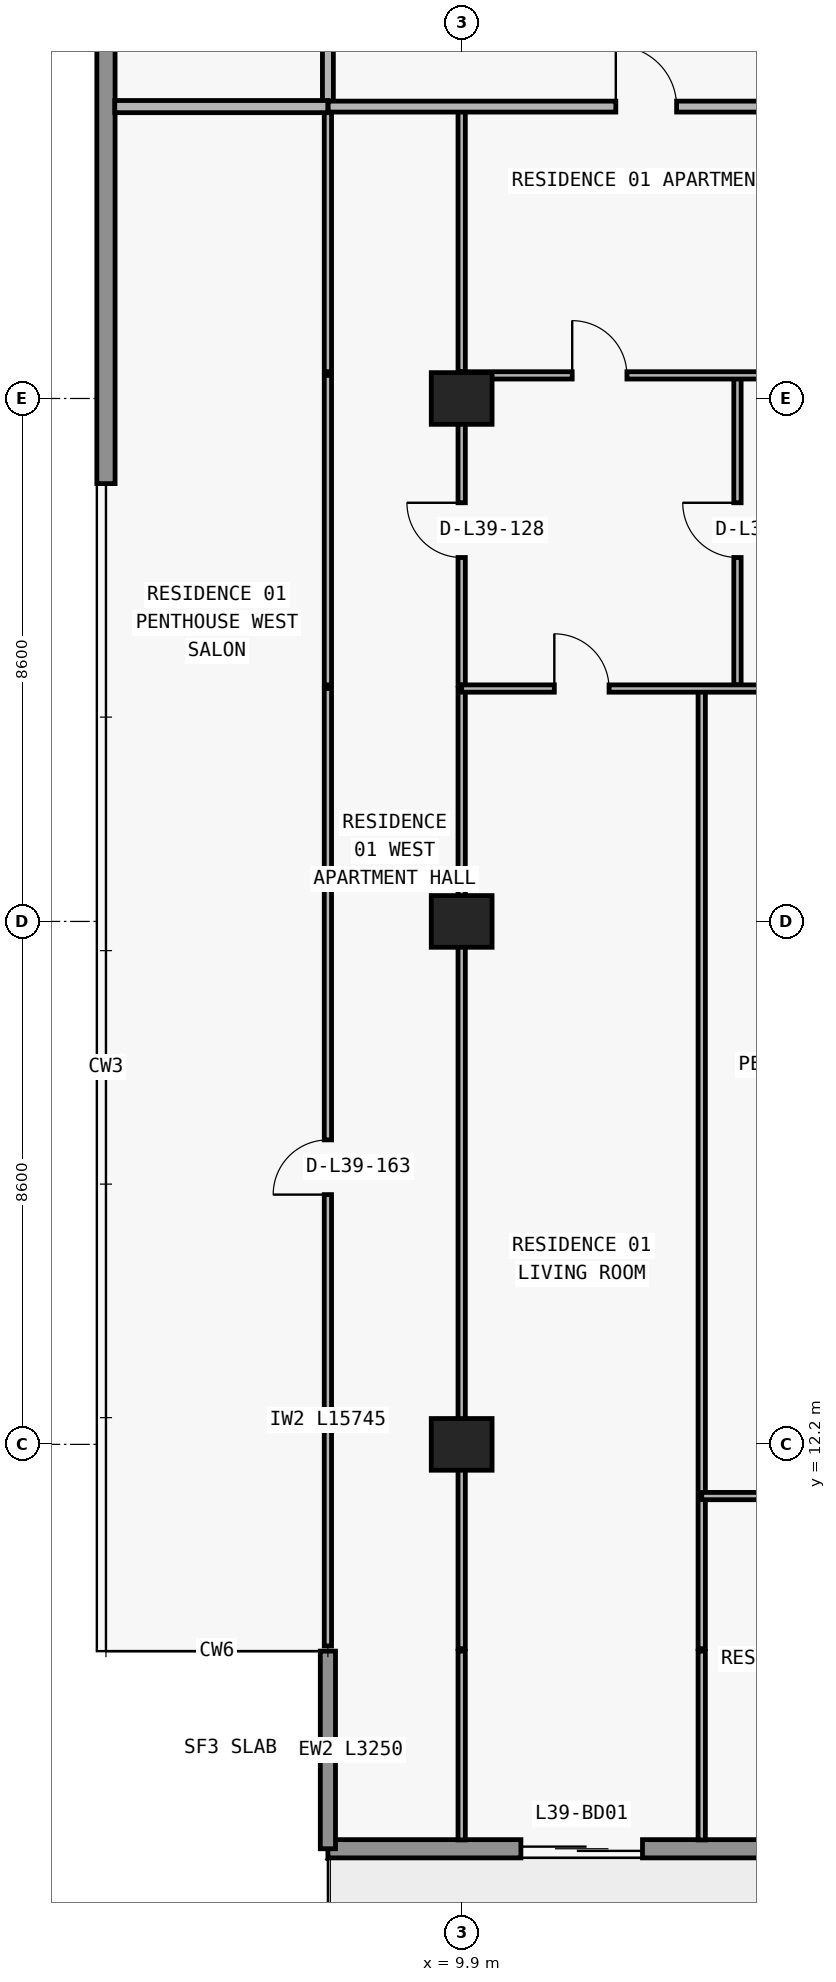
"""IFC4 building model, lengths in metres.
Left out: names, types, materials, properties, quantities, classifications, styles, units other than length and angle.
Written with IfcOpenShell. Run it as: python <this file> out.ifc"""

import sys

from ifc_helpers import new_model, si_unit, direction, frame, frame_2d, origin, origin_2d, place, context, subcontext, project, spatial, rectangle, extrude, element, fill, save


model = new_model("IFC4")
c1 = context("Model", 3, precision=1e-05, world=origin(), true_north=direction((0.0, 1.0)))
c2 = subcontext(c1, "Body", "Model", "MODEL_VIEW")
j1 = project(units=[si_unit("LENGTHUNIT", "METRE"), si_unit("PLANEANGLEUNIT", "RADIAN")], contexts=[c1])
p1 = place(None, origin())
s1 = spatial("IfcSite", under=j1, at=p1, CompositionType="ELEMENT")
p2 = place(p1, origin())
s2 = spatial("IfcBuilding", under=s1, at=p2, CompositionType="ELEMENT")
p3 = place(p2, frame((0.0, 0.0, 142.2)))
s3 = spatial("IfcBuildingStorey", under=s2, at=p3, CompositionType="ELEMENT", Elevation=142.2)
for number, where, z_axis, x_axis in (
    (1, (9.9, 12.2, 0.0), (0.0, 0.0, 1.0), (1.0, 0.0, 0.0)),
    (2, (9.9, 20.8, 0.0), (0.0, 0.0, 1.0), (1.0, 0.0, 0.0)),
    (3, (9.9, 29.4, 0.0), (0.0, 0.0, 1.0), (1.0, 0.0, 0.0)),
):
    element("IfcColumn", number, at=place(p3, frame(where, z_axis=z_axis, x_axis=x_axis)), inside=s3, PredefinedType="COLUMN", context=c2, shape_type="SweptSolid", body=[
        extrude(rectangle(XDim=1.0, YDim=0.85, at=origin_2d()), origin(), (0.0, 0.0, 1.0), 3.05),
    ])
p4 = place(p3, frame((70.1, 5.55, 0.0), z_axis=(0.0, 0.0, 1.0), x_axis=(-1.0, 0.0, 0.0)))
e4 = element("IfcWall", 4, at=p4, inside=s3, PredefinedType="STANDARD", context=c2, shape_type="SweptSolid", body=[
    extrude(rectangle(XDim=62.4, YDim=0.3, at=frame_2d((31.2, 0.0))), origin(), (0.0, 0.0, 1.0), 3.05),
])
p5 = place(p4, frame((57.226, 0.0, 0.0)))
e5 = element("IfcOpeningElement", 5, at=p5, cuts=e4, PredefinedType="OPENING", context=c2, shape_type="SweptSolid", body=[
    extrude(rectangle(XDim=2.0, YDim=2.3, at=frame_2d((1.0, 1.15))), frame((0.0, 0.16, 0.0), z_axis=(0.0, -1.0, 0.0), x_axis=(1.0, 0.0, 0.0)), (0.0, 0.0, 1.0), 0.32),
])
p6 = place(p4, frame((52.926, 0.0, 0.85)))
e6 = element("IfcOpeningElement", 6, at=p6, cuts=e4, PredefinedType="OPENING", context=c2, shape_type="SweptSolid", body=[
    extrude(rectangle(XDim=2.2, YDim=1.55, at=frame_2d((1.1, 0.775))), frame((0.0, 0.16, 0.0), z_axis=(0.0, -1.0, 0.0), x_axis=(1.0, 0.0, 0.0)), (0.0, 0.0, 1.0), 0.32),
])
p7 = place(p4, frame((48.49, 0.0, 0.0)))
e7 = element("IfcOpeningElement", 7, at=p7, cuts=e4, PredefinedType="OPENING", context=c2, shape_type="SweptSolid", body=[
    extrude(rectangle(XDim=2.0, YDim=2.3, at=frame_2d((1.0, 1.15))), frame((0.0, 0.16, 0.0), z_axis=(0.0, -1.0, 0.0), x_axis=(1.0, 0.0, 0.0)), (0.0, 0.0, 1.0), 0.32),
])
p8 = place(p4, frame((44.39, 0.0, 0.85)))
e8 = element("IfcOpeningElement", 8, at=p8, cuts=e4, PredefinedType="OPENING", context=c2, shape_type="SweptSolid", body=[
    extrude(rectangle(XDim=1.8, YDim=1.55, at=frame_2d((0.9, 0.775))), frame((0.0, 0.16, 0.0), z_axis=(0.0, -1.0, 0.0), x_axis=(1.0, 0.0, 0.0)), (0.0, 0.0, 1.0), 0.32),
])
p9 = place(p4, frame((40.426, 0.0, 0.0)))
e9 = element("IfcOpeningElement", 9, at=p9, cuts=e4, PredefinedType="OPENING", context=c2, shape_type="SweptSolid", body=[
    extrude(rectangle(XDim=2.0, YDim=2.3, at=frame_2d((1.0, 1.15))), frame((0.0, 0.16, 0.0), z_axis=(0.0, -1.0, 0.0), x_axis=(1.0, 0.0, 0.0)), (0.0, 0.0, 1.0), 0.32),
])
p10 = place(p4, frame((36.126, 0.0, 0.85)))
e10 = element("IfcOpeningElement", 10, at=p10, cuts=e4, PredefinedType="OPENING", context=c2, shape_type="SweptSolid", body=[
    extrude(rectangle(XDim=2.2, YDim=1.55, at=frame_2d((1.1, 0.775))), frame((0.0, 0.16, 0.0), z_axis=(0.0, -1.0, 0.0), x_axis=(1.0, 0.0, 0.0)), (0.0, 0.0, 1.0), 0.32),
])
p11 = place(p4, frame((32.09, 0.0, 0.0)))
e11 = element("IfcOpeningElement", 11, at=p11, cuts=e4, PredefinedType="OPENING", context=c2, shape_type="SweptSolid", body=[
    extrude(rectangle(XDim=2.0, YDim=2.3, at=frame_2d((1.0, 1.15))), frame((0.0, 0.16, 0.0), z_axis=(0.0, -1.0, 0.0), x_axis=(1.0, 0.0, 0.0)), (0.0, 0.0, 1.0), 0.32),
])
p12 = place(p4, frame((28.21, 0.0, 0.65)))
e12 = element("IfcOpeningElement", 12, at=p12, cuts=e4, PredefinedType="OPENING", context=c2, shape_type="SweptSolid", body=[
    extrude(rectangle(XDim=2.6, YDim=1.85, at=frame_2d((1.3, 0.925))), frame((0.0, 0.16, 0.0), z_axis=(0.0, -1.0, 0.0), x_axis=(1.0, 0.0, 0.0)), (0.0, 0.0, 1.0), 0.32),
])
p13 = place(p4, frame((22.1, 0.0, 0.85)))
e13 = element("IfcOpeningElement", 13, at=p13, cuts=e4, PredefinedType="OPENING", context=c2, shape_type="SweptSolid", body=[
    extrude(rectangle(XDim=2.2, YDim=1.55, at=frame_2d((1.1, 0.775))), frame((0.0, 0.16, 0.0), z_axis=(0.0, -1.0, 0.0), x_axis=(1.0, 0.0, 0.0)), (0.0, 0.0, 1.0), 0.32),
])
p14 = place(p4, frame((16.09, 0.0, 0.0)))
e14 = element("IfcOpeningElement", 14, at=p14, cuts=e4, PredefinedType="OPENING", context=c2, shape_type="SweptSolid", body=[
    extrude(rectangle(XDim=2.0, YDim=2.3, at=frame_2d((1.0, 1.15))), frame((0.0, 0.16, 0.0), z_axis=(0.0, -1.0, 0.0), x_axis=(1.0, 0.0, 0.0)), (0.0, 0.0, 1.0), 0.32),
])
p15 = place(p4, frame((11.41, 0.0, 0.65)))
e15 = element("IfcOpeningElement", 15, at=p15, cuts=e4, PredefinedType="OPENING", context=c2, shape_type="SweptSolid", body=[
    extrude(rectangle(XDim=2.6, YDim=1.85, at=frame_2d((1.3, 0.925))), frame((0.0, 0.16, 0.0), z_axis=(0.0, -1.0, 0.0), x_axis=(1.0, 0.0, 0.0)), (0.0, 0.0, 1.0), 0.32),
])
p16 = place(p4, frame((5.3, 0.0, 0.85)))
e16 = element("IfcOpeningElement", 16, at=p16, cuts=e4, PredefinedType="OPENING", context=c2, shape_type="SweptSolid", body=[
    extrude(rectangle(XDim=2.2, YDim=1.55, at=frame_2d((1.1, 0.775))), frame((0.0, 0.16, 0.0), z_axis=(0.0, -1.0, 0.0), x_axis=(1.0, 0.0, 0.0)), (0.0, 0.0, 1.0), 0.32),
])
p17 = place(p3, frame((7.7, 8.8, 0.0), z_axis=(0.0, 0.0, 1.0), x_axis=(0.0, -1.0, 0.0)))
e17 = element("IfcWall", 17, at=p17, inside=s3, PredefinedType="ELEMENTEDWALL", context=c2, shape_type="SweptSolid", body=[
    extrude(rectangle(XDim=3.25, YDim=0.25, at=frame_2d((1.625, 0.0))), origin(), (0.0, 0.0, 1.0), 3.05),
])
p18 = place(p3, frame((4.05, 28.0, 0.0), z_axis=(0.0, 0.0, 1.0), x_axis=(0.0, 1.0, 0.0)))
e18 = element("IfcWall", 18, at=p18, inside=s3, PredefinedType="STANDARD", context=c2, shape_type="SweptSolid", body=[
    extrude(rectangle(XDim=19.2, YDim=0.3, at=frame_2d((9.6, 0.0))), origin(), (0.0, 0.0, 1.0), 3.05),
])
p19 = place(p3, frame((7.7, 8.885, 0.0), z_axis=(0.0, 0.0, 1.0), x_axis=(0.0, 1.0, 0.0)))
e19 = element("IfcWall", 19, at=p19, inside=s3, PredefinedType="PARTITIONING", context=c2, shape_type="SweptSolid", body=[
    extrude(rectangle(XDim=15.745, YDim=0.12, at=frame_2d((7.873, 0.0))), origin(), (0.0, 0.0, 1.0), 3.05),
])
p20 = place(p19, frame((7.423, 0.0, 0.0)))
e20 = element("IfcOpeningElement", 20, at=p20, cuts=e19, PredefinedType="OPENING", context=c2, shape_type="SweptSolid", body=[
    extrude(rectangle(XDim=0.9, YDim=2.15, at=frame_2d((0.45, 1.075))), frame((0.0, 0.07, 0.0), z_axis=(0.0, -1.0, 0.0), x_axis=(1.0, 0.0, 0.0)), (0.0, 0.0, 1.0), 0.14),
])
p21 = place(p3, frame((7.7, 24.69, 0.0), z_axis=(0.0, 0.0, 1.0), x_axis=(0.0, 1.0, 0.0)))
e21 = element("IfcWall", 21, at=p21, inside=s3, PredefinedType="PARTITIONING", context=c2, shape_type="SweptSolid", body=[
    extrude(rectangle(XDim=5.09, YDim=0.12, at=frame_2d((2.545, 0.0))), origin(), (0.0, 0.0, 1.0), 3.05),
])
p22 = place(p3, frame((7.7, 29.84, 0.0), z_axis=(0.0, 0.0, 1.0), x_axis=(0.0, 1.0, 0.0)))
e22 = element("IfcWall", 22, at=p22, inside=s3, PredefinedType="PARTITIONING", context=c2, shape_type="SweptSolid", body=[
    extrude(rectangle(XDim=4.36, YDim=0.12, at=frame_2d((2.18, 0.0))), origin(), (0.0, 0.0, 1.0), 3.05),
])
p23 = place(p3, frame((7.7, 34.205, 0.0), z_axis=(0.0, 0.0, 1.0), x_axis=(0.0, 1.0, 0.0)))
e23 = element("IfcWall", 23, at=p23, inside=s3, PredefinedType="PARTITIONING", context=c2, shape_type="SweptSolid", body=[
    extrude(rectangle(XDim=2.745, YDim=0.18, at=frame_2d((1.373, 0.0))), origin(), (0.0, 0.0, 1.0), 3.05),
])
p24 = place(p3, frame((9.9, 5.695, 0.0), z_axis=(0.0, 0.0, 1.0), x_axis=(0.0, 1.0, 0.0)))
e24 = element("IfcWall", 24, at=p24, inside=s3, PredefinedType="PARTITIONING", context=c2, shape_type="SweptSolid", body=[
    extrude(rectangle(XDim=3.105, YDim=0.12, at=frame_2d((1.552, 0.0))), origin(), (0.0, 0.0, 1.0), 3.05),
])
p25 = place(p3, frame((9.9, 8.84, 0.0), z_axis=(0.0, 0.0, 1.0), x_axis=(0.0, 1.0, 0.0)))
e25 = element("IfcWall", 25, at=p25, inside=s3, PredefinedType="PARTITIONING", context=c2, shape_type="SweptSolid", body=[
    extrude(rectangle(XDim=15.79, YDim=0.12, at=frame_2d((7.895, 0.0))), origin(), (0.0, 0.0, 1.0), 2.174),
])
p26 = place(p3, frame((9.9, 24.69, 0.0), z_axis=(0.0, 0.0, 1.0), x_axis=(0.0, 1.0, 0.0)))
e26 = element("IfcWall", 26, at=p26, inside=s3, PredefinedType="PARTITIONING", context=c2, shape_type="SweptSolid", body=[
    extrude(rectangle(XDim=5.09, YDim=0.12, at=frame_2d((2.545, 0.0))), origin(), (0.0, 0.0, 1.0), 2.174),
])
p27 = place(p26, frame((2.095, 0.0, 0.0)))
e27 = element("IfcOpeningElement", 27, at=p27, cuts=e26, PredefinedType="OPENING", context=c2, shape_type="SweptSolid", body=[
    extrude(rectangle(XDim=0.9, YDim=2.124, at=frame_2d((0.45, 1.062))), frame((0.0, 0.07, 0.0), z_axis=(0.0, -1.0, 0.0), x_axis=(1.0, 0.0, 0.0)), (0.0, 0.0, 1.0), 0.14),
])
p28 = place(p3, frame((9.9, 29.84, 0.0), z_axis=(0.0, 0.0, 1.0), x_axis=(0.0, 1.0, 0.0)))
e28 = element("IfcWall", 28, at=p28, inside=s3, PredefinedType="PARTITIONING", context=c2, shape_type="SweptSolid", body=[
    extrude(rectangle(XDim=4.36, YDim=0.12, at=frame_2d((2.18, 0.0))), origin(), (0.0, 0.0, 1.0), 2.174),
])
p29 = place(p3, frame((13.848, 5.695, 0.0), z_axis=(0.0, 0.0, 1.0), x_axis=(0.0, 1.0, 0.0)))
e29 = element("IfcWall", 29, at=p29, inside=s3, PredefinedType="PARTITIONING", context=c2, shape_type="SweptSolid", body=[
    extrude(rectangle(XDim=3.105, YDim=0.12, at=frame_2d((1.552, 0.0))), origin(), (0.0, 0.0, 1.0), 3.05),
])
p30 = place(p3, frame((13.848, 8.84, 0.0), z_axis=(0.0, 0.0, 1.0), x_axis=(0.0, 1.0, 0.0)))
e30 = element("IfcWall", 30, at=p30, inside=s3, PredefinedType="PARTITIONING", context=c2, shape_type="SweptSolid", body=[
    extrude(rectangle(XDim=15.79, YDim=0.12, at=frame_2d((7.895, 0.0))), origin(), (0.0, 0.0, 1.0), 3.05),
])
p31 = place(p3, frame((14.436, 24.69, 0.0), z_axis=(0.0, 0.0, 1.0), x_axis=(0.0, 1.0, 0.0)))
e31 = element("IfcWall", 31, at=p31, inside=s3, PredefinedType="PARTITIONING", context=c2, shape_type="SweptSolid", body=[
    extrude(rectangle(XDim=5.09, YDim=0.12, at=frame_2d((2.545, 0.0))), origin(), (0.0, 0.0, 1.0), 3.05),
])
p32 = place(p31, frame((2.095, 0.0, 0.0)))
e32 = element("IfcOpeningElement", 32, at=p32, cuts=e31, PredefinedType="OPENING", context=c2, shape_type="SweptSolid", body=[
    extrude(rectangle(XDim=0.9, YDim=2.15, at=frame_2d((0.45, 1.075))), frame((0.0, 0.07, 0.0), z_axis=(0.0, -1.0, 0.0), x_axis=(1.0, 0.0, 0.0)), (0.0, 0.0, 1.0), 0.14),
])
p33 = place(p3, frame((13.848, 11.35, 0.0), z_axis=(0.0, 0.0, 1.0), x_axis=(1.0, 0.0, 0.0)))
e33 = element("IfcWall", 33, at=p33, inside=s3, PredefinedType="PARTITIONING", context=c2, shape_type="SweptSolid", body=[
    extrude(rectangle(XDim=4.402, YDim=0.12, at=frame_2d((2.201, 0.0))), origin(), (0.0, 0.0, 1.0), 3.05),
])
p34 = place(p33, frame((1.751, 0.0, 0.0)))
e34 = element("IfcOpeningElement", 34, at=p34, cuts=e33, PredefinedType="OPENING", context=c2, shape_type="SweptSolid", body=[
    extrude(rectangle(XDim=0.9, YDim=2.15, at=frame_2d((0.45, 1.075))), frame((0.0, 0.07, 0.0), z_axis=(0.0, -1.0, 0.0), x_axis=(1.0, 0.0, 0.0)), (0.0, 0.0, 1.0), 0.14),
])
p35 = place(p3, frame((9.9, 24.63, 0.0), z_axis=(0.0, 0.0, 1.0), x_axis=(1.0, 0.0, 0.0)))
e35 = element("IfcWall", 35, at=p35, inside=s3, PredefinedType="PARTITIONING", context=c2, shape_type="SweptSolid", body=[
    extrude(rectangle(XDim=8.35, YDim=0.12, at=frame_2d((4.175, 0.0))), origin(), (0.0, 0.0, 1.0), 3.05),
])
p36 = place(p35, frame((1.524, 0.0, 0.0)))
e36 = element("IfcOpeningElement", 36, at=p36, cuts=e35, PredefinedType="OPENING", context=c2, shape_type="SweptSolid", body=[
    extrude(rectangle(XDim=0.9, YDim=2.15, at=frame_2d((0.45, 1.075))), frame((0.0, 0.07, 0.0), z_axis=(0.0, -1.0, 0.0), x_axis=(1.0, 0.0, 0.0)), (0.0, 0.0, 1.0), 0.14),
])
p37 = place(p35, frame((5.993, 0.0, 0.0)))
e37 = element("IfcOpeningElement", 37, at=p37, cuts=e35, PredefinedType="OPENING", context=c2, shape_type="SweptSolid", body=[
    extrude(rectangle(XDim=0.9, YDim=2.15, at=frame_2d((0.45, 1.075))), frame((0.0, 0.07, 0.0), z_axis=(0.0, -1.0, 0.0), x_axis=(1.0, 0.0, 0.0)), (0.0, 0.0, 1.0), 0.14),
])
p38 = place(p3, frame((9.9, 29.78, 0.0), z_axis=(0.0, 0.0, 1.0), x_axis=(1.0, 0.0, 0.0)))
e38 = element("IfcWall", 38, at=p38, inside=s3, PredefinedType="PARTITIONING", context=c2, shape_type="SweptSolid", body=[
    extrude(rectangle(XDim=8.35, YDim=0.12, at=frame_2d((4.175, 0.0))), origin(), (0.0, 0.0, 1.0), 3.05),
])
p39 = place(p38, frame((1.818, 0.0, 0.0)))
e39 = element("IfcOpeningElement", 39, at=p39, cuts=e38, PredefinedType="OPENING", context=c2, shape_type="SweptSolid", body=[
    extrude(rectangle(XDim=0.9, YDim=2.15, at=frame_2d((0.45, 1.075))), frame((0.0, 0.07, 0.0), z_axis=(0.0, -1.0, 0.0), x_axis=(1.0, 0.0, 0.0)), (0.0, 0.0, 1.0), 0.14),
])
p40 = place(p3, frame((4.195, 34.2, 0.0), z_axis=(0.0, 0.0, 1.0), x_axis=(1.0, 0.0, 0.0)))
e40 = element("IfcWall", 40, at=p40, inside=s3, PredefinedType="PARTITIONING", context=c2, shape_type="SweptSolid", body=[
    extrude(rectangle(XDim=3.505, YDim=0.2, at=frame_2d((1.752, 0.0))), origin(), (0.0, 0.0, 1.0), 3.05),
])
p41 = place(p3, frame((7.705, 34.2, 0.0), z_axis=(0.0, 0.0, 1.0), x_axis=(1.0, 0.0, 0.0)))
e41 = element("IfcWall", 41, at=p41, inside=s3, PredefinedType="PARTITIONING", context=c2, shape_type="SweptSolid", body=[
    extrude(rectangle(XDim=10.545, YDim=0.18, at=frame_2d((5.272, 0.0))), origin(), (0.0, 0.0, 1.0), 3.05),
])
p42 = place(p41, frame((4.73, 0.0, 0.0)))
e42 = element("IfcOpeningElement", 42, at=p42, cuts=e41, PredefinedType="OPENING", context=c2, shape_type="SweptSolid", body=[
    extrude(rectangle(XDim=1.0, YDim=2.2, at=frame_2d((0.5, 1.1))), frame((0.0, 0.1, 0.0), z_axis=(0.0, -1.0, 0.0), x_axis=(1.0, 0.0, 0.0)), (0.0, 0.0, 1.0), 0.2),
])
p43 = place(p5, origin())
e43 = element("IfcDoor", 43, at=p43, inside=s3, OperationType="DOUBLE_DOOR_SLIDING", PredefinedType="DOOR", context=c2, shape_type="SweptSolid", body=[
    extrude(rectangle(XDim=2.0, YDim=2.3, at=frame_2d((1.0, 1.15))), frame((0.0, 0.025, 0.0), z_axis=(0.0, -1.0, 0.0), x_axis=(1.0, 0.0, 0.0)), (0.0, 0.0, 1.0), 0.05),
])
fill(e5, e43)
p44 = place(p42, origin())
e44 = element("IfcDoor", 44, at=p44, inside=s3, OperationType="SINGLE_SWING_LEFT", PredefinedType="DOOR", context=c2, shape_type="SweptSolid", body=[
    extrude(rectangle(XDim=1.0, YDim=2.2, at=frame_2d((0.5, 1.1))), frame((0.0, 0.025, 0.0), z_axis=(0.0, -1.0, 0.0), x_axis=(1.0, 0.0, 0.0)), (0.0, 0.0, 1.0), 0.05),
])
fill(e42, e44)
p45 = place(p39, origin())
e45 = element("IfcDoor", 45, at=p45, inside=s3, OperationType="SINGLE_SWING_LEFT", PredefinedType="DOOR", context=c2, shape_type="SweptSolid", body=[
    extrude(rectangle(XDim=0.9, YDim=2.15, at=frame_2d((0.45, 1.075))), frame((0.0, 0.025, 0.0), z_axis=(0.0, -1.0, 0.0), x_axis=(1.0, 0.0, 0.0)), (0.0, 0.0, 1.0), 0.05),
])
fill(e39, e45)
p46 = place(p32, origin())
e46 = element("IfcDoor", 46, at=p46, inside=s3, OperationType="SINGLE_SWING_RIGHT", PredefinedType="DOOR", context=c2, shape_type="SweptSolid", body=[
    extrude(rectangle(XDim=0.9, YDim=2.15, at=frame_2d((0.45, 1.075))), frame((0.0, 0.025, 0.0), z_axis=(0.0, -1.0, 0.0), x_axis=(1.0, 0.0, 0.0)), (0.0, 0.0, 1.0), 0.05),
])
fill(e32, e46)
p47 = place(p36, origin())
e47 = element("IfcDoor", 47, at=p47, inside=s3, OperationType="SINGLE_SWING_LEFT", PredefinedType="DOOR", context=c2, shape_type="SweptSolid", body=[
    extrude(rectangle(XDim=0.9, YDim=2.15, at=frame_2d((0.45, 1.075))), frame((0.0, 0.025, 0.0), z_axis=(0.0, -1.0, 0.0), x_axis=(1.0, 0.0, 0.0)), (0.0, 0.0, 1.0), 0.05),
])
fill(e36, e47)
p48 = place(p27, origin())
e48 = element("IfcDoor", 48, at=p48, inside=s3, OperationType="SINGLE_SWING_RIGHT", PredefinedType="DOOR", context=c2, shape_type="SweptSolid", body=[
    extrude(rectangle(XDim=0.9, YDim=2.124, at=frame_2d((0.45, 1.062))), frame((0.0, 0.025, 0.0), z_axis=(0.0, -1.0, 0.0), x_axis=(1.0, 0.0, 0.0)), (0.0, 0.0, 1.0), 0.05),
])
fill(e27, e48)
p49 = place(p20, origin())
e49 = element("IfcDoor", 49, at=p49, inside=s3, OperationType="SINGLE_SWING_LEFT", PredefinedType="DOOR", context=c2, shape_type="SweptSolid", body=[
    extrude(rectangle(XDim=0.9, YDim=2.15, at=frame_2d((0.45, 1.075))), frame((0.0, 0.025, 0.0), z_axis=(0.0, -1.0, 0.0), x_axis=(1.0, 0.0, 0.0)), (0.0, 0.0, 1.0), 0.05),
])
fill(e20, e49)
save(model, sys.argv[1])
